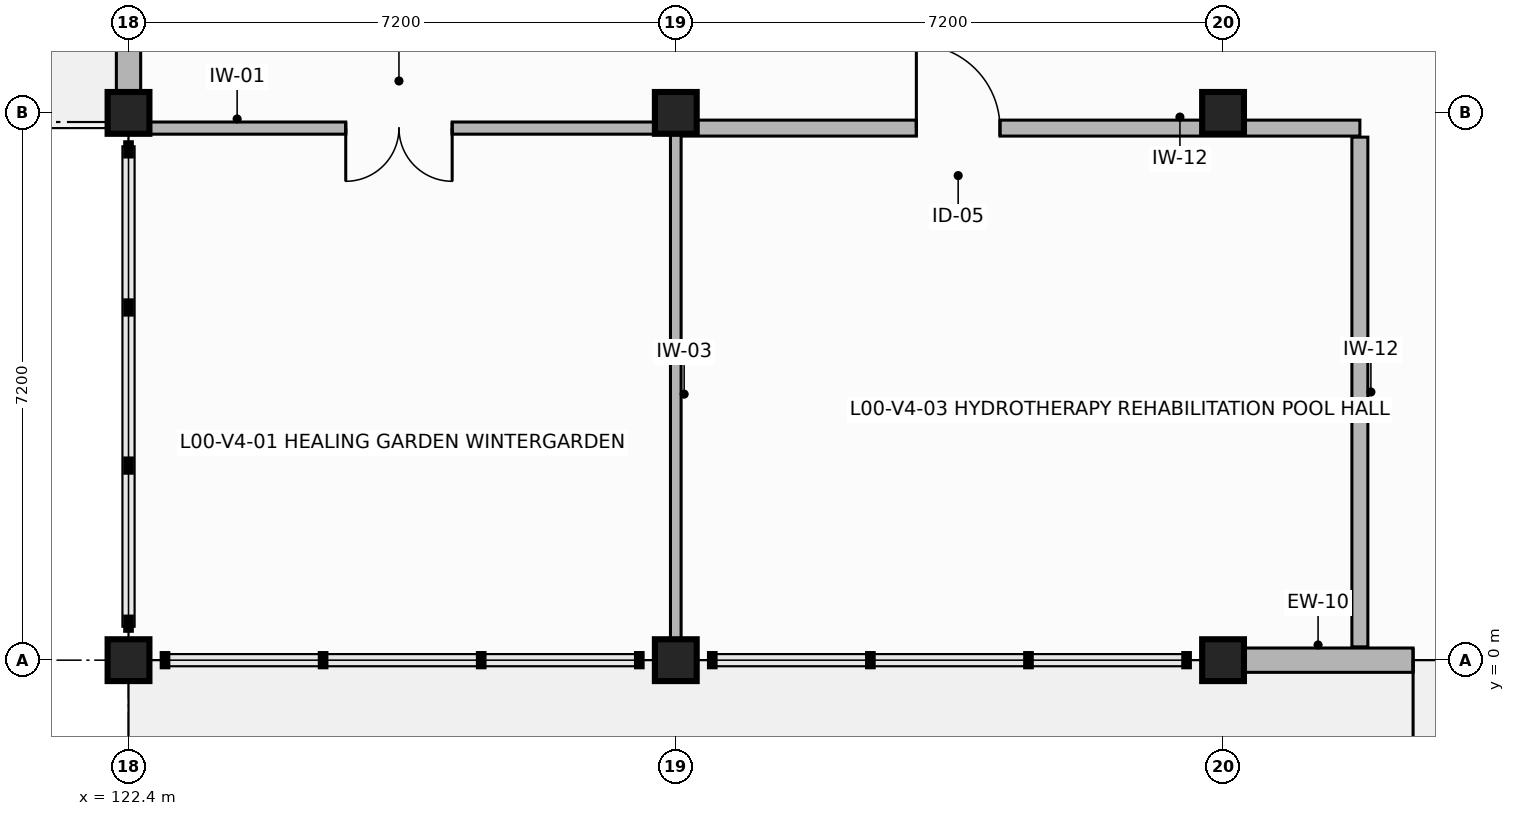
"""IFC4 building model, lengths in metres.
Left out: names, types, materials, properties, quantities, classifications, styles, units other than length and angle.
Written with IfcOpenShell. Run it as: python <this file> out.ifc"""

import sys

from ifc_helpers import new_model, si_unit, direction, frame, frame_2d, origin, origin_2d, place, context, subcontext, project, spatial, rectangle, extrude, element, fill, save


model = new_model("IFC4")
c1 = context("Model", 3, precision=1e-05, world=origin(), true_north=direction((0.0, 1.0)))
c2 = subcontext(c1, "Body", "Model", "MODEL_VIEW")
j1 = project(units=[si_unit("LENGTHUNIT", "METRE"), si_unit("PLANEANGLEUNIT", "RADIAN")], contexts=[c1])
p1 = place(None, origin())
s1 = spatial("IfcSite", under=j1, at=p1, CompositionType="ELEMENT")
p2 = place(p1, origin())
s2 = spatial("IfcBuilding", under=s1, at=p2, CompositionType="ELEMENT")
p3 = place(p2, origin())
s3 = spatial("IfcBuildingStorey", under=s2, at=p3, CompositionType="ELEMENT", Elevation=0.0)
for number, where, z_axis, x_axis in (
    (1, (122.4, 0.0, -0.35), (0.0, 0.0, 1.0), (1.0, 0.0, 0.0)),
    (2, (122.4, 7.2, -0.35), (0.0, 0.0, 1.0), (1.0, 0.0, 0.0)),
    (3, (129.6, 0.0, -0.35), (0.0, 0.0, 1.0), (1.0, 0.0, 0.0)),
    (4, (129.6, 7.2, -0.35), (0.0, 0.0, 1.0), (1.0, 0.0, 0.0)),
    (5, (136.8, 0.0, -0.35), (0.0, 0.0, 1.0), (1.0, 0.0, 0.0)),
    (6, (136.8, 7.2, -0.35), (0.0, 0.0, 1.0), (1.0, 0.0, 0.0)),
):
    element("IfcColumn", number, at=place(p3, frame(where, z_axis=z_axis, x_axis=x_axis)), inside=s3, PredefinedType="COLUMN", context=c2, shape_type="SweptSolid", body=[
        extrude(rectangle(XDim=0.55, YDim=0.55, at=origin_2d()), origin(), (0.0, 0.0, 1.0), 4.59),
    ])
p4 = place(p3, frame((136.8, 0.0, 0.0), z_axis=(0.0, 0.0, 1.0), x_axis=(1.0, 0.0, 0.0)))
e7 = element("IfcWall", 7, at=p4, inside=s3, PredefinedType="SOLIDWALL", context=c2, shape_type="SweptSolid", body=[
    extrude(rectangle(XDim=7.2, YDim=0.32, at=frame_2d((3.6, 0.0))), origin(), (0.0, 0.0, 1.0), 3.62),
])
p5 = place(p4, frame((2.5, 0.0, 0.0)))
e8 = element("IfcOpeningElement", 8, at=p5, cuts=e7, PredefinedType="OPENING", context=c2, shape_type="SweptSolid", body=[
    extrude(rectangle(XDim=2.2, YDim=2.6, at=frame_2d((1.1, 1.3))), frame((0.0, 0.17, 0.0), z_axis=(0.0, -1.0, 0.0), x_axis=(1.0, 0.0, 0.0)), (0.0, 0.0, 1.0), 0.34),
])
p6 = place(p3, frame((122.4, 14.4, 0.0), z_axis=(0.0, 0.0, 1.0), x_axis=(0.0, -1.0, 0.0)))
e9 = element("IfcWall", 9, at=p6, inside=s3, PredefinedType="SOLIDWALL", context=c2, shape_type="SweptSolid", body=[
    extrude(rectangle(XDim=7.2, YDim=0.32, at=frame_2d((3.6, 0.0))), origin(), (0.0, 0.0, 1.0), 3.62),
])
p7 = place(p6, frame((4.3, 0.0, 0.0)))
e10 = element("IfcOpeningElement", 10, at=p7, cuts=e9, PredefinedType="OPENING", context=c2, shape_type="SweptSolid", body=[
    extrude(rectangle(XDim=1.6, YDim=2.4, at=frame_2d((0.8, 1.2))), frame((0.0, 0.17, 0.0), z_axis=(0.0, -1.0, 0.0), x_axis=(1.0, 0.0, 0.0)), (0.0, 0.0, 1.0), 0.34),
])
p8 = place(p3, frame((129.6, 7.0, 0.0), z_axis=(0.0, 0.0, 1.0), x_axis=(0.0, -1.0, 0.0)))
e11 = element("IfcWall", 11, at=p8, inside=s3, PredefinedType="PARTITIONING", context=c2, shape_type="SweptSolid", body=[
    extrude(rectangle(XDim=7.0, YDim=0.14, at=frame_2d((3.5, 0.0))), origin(), (0.0, 0.0, 1.0), 3.6),
])
p9 = place(p3, frame((122.4, 7.0, 0.0), z_axis=(0.0, 0.0, 1.0), x_axis=(1.0, 0.0, 0.0)))
e12 = element("IfcWall", 12, at=p9, inside=s3, PredefinedType="PARTITIONING", context=c2, shape_type="SweptSolid", body=[
    extrude(rectangle(XDim=7.116, YDim=0.16, at=frame_2d((3.558, 0.0))), origin(), (0.0, 0.0, 1.0), 3.6),
])
p10 = place(p9, frame((2.858, 0.0, 0.0)))
e13 = element("IfcOpeningElement", 13, at=p10, cuts=e12, PredefinedType="OPENING", context=c2, shape_type="SweptSolid", body=[
    extrude(rectangle(XDim=1.4, YDim=2.3, at=frame_2d((0.7, 1.15))), frame((0.0, 0.09, 0.0), z_axis=(0.0, -1.0, 0.0), x_axis=(1.0, 0.0, 0.0)), (0.0, 0.0, 1.0), 0.18),
])
p11 = place(p3, frame((129.684, 7.0, 0.0), z_axis=(0.0, 0.0, 1.0), x_axis=(1.0, 0.0, 0.0)))
e14 = element("IfcWall", 14, at=p11, inside=s3, PredefinedType="PARTITIONING", context=c2, shape_type="SweptSolid", body=[
    extrude(rectangle(XDim=8.916, YDim=0.21, at=frame_2d((4.458, 0.0))), origin(), (0.0, 0.0, 1.0), 3.6),
])
p12 = place(p11, frame((3.081, 0.0, 0.0)))
e15 = element("IfcOpeningElement", 15, at=p12, cuts=e14, PredefinedType="OPENING", context=c2, shape_type="SweptSolid", body=[
    extrude(rectangle(XDim=1.1, YDim=2.2, at=frame_2d((0.55, 1.1))), frame((0.0, 0.115, 0.0), z_axis=(0.0, -1.0, 0.0), x_axis=(1.0, 0.0, 0.0)), (0.0, 0.0, 1.0), 0.23),
])
p13 = place(p3, frame((138.6, 6.881, 0.0), z_axis=(0.0, 0.0, 1.0), x_axis=(0.0, -1.0, 0.0)))
e16 = element("IfcWall", 16, at=p13, inside=s3, PredefinedType="PARTITIONING", context=c2, shape_type="SweptSolid", body=[
    extrude(rectangle(XDim=6.706, YDim=0.21, at=frame_2d((3.353, 0.0))), origin(), (0.0, 0.0, 1.0), 3.6),
])
p14 = place(p5, frame((2.2, 0.0, 0.0), z_axis=(0.0, 0.0, 1.0), x_axis=(-1.0, 0.0, 0.0)))
e17 = element("IfcDoor", 17, at=p14, inside=s3, OperationType="DOUBLE_DOOR_SINGLE_SWING", PredefinedType="DOOR", context=c2, shape_type="SweptSolid", body=[
    extrude(rectangle(XDim=2.2, YDim=2.6, at=frame_2d((1.1, 1.3))), frame((0.0, 0.025, 0.0), z_axis=(0.0, -1.0, 0.0), x_axis=(1.0, 0.0, 0.0)), (0.0, 0.0, 1.0), 0.05),
])
fill(e8, e17)
p15 = place(p10, frame((1.4, 0.0, 0.0), z_axis=(0.0, 0.0, 1.0), x_axis=(-1.0, 0.0, 0.0)))
e18 = element("IfcDoor", 18, at=p15, inside=s3, OperationType="DOUBLE_DOOR_SINGLE_SWING", PredefinedType="DOOR", context=c2, shape_type="SweptSolid", body=[
    extrude(rectangle(XDim=1.4, YDim=2.3, at=frame_2d((0.7, 1.15))), frame((0.0, 0.025, 0.0), z_axis=(0.0, -1.0, 0.0), x_axis=(1.0, 0.0, 0.0)), (0.0, 0.0, 1.0), 0.05),
])
fill(e13, e18)
p16 = place(p12, origin())
e19 = element("IfcDoor", 19, at=p16, inside=s3, OperationType="SINGLE_SWING_LEFT", PredefinedType="DOOR", context=c2, shape_type="SweptSolid", body=[
    extrude(rectangle(XDim=1.1, YDim=2.2, at=frame_2d((0.55, 1.1))), frame((0.0, 0.025, 0.0), z_axis=(0.0, -1.0, 0.0), x_axis=(1.0, 0.0, 0.0)), (0.0, 0.0, 1.0), 0.05),
])
fill(e15, e19)
save(model, sys.argv[1])
